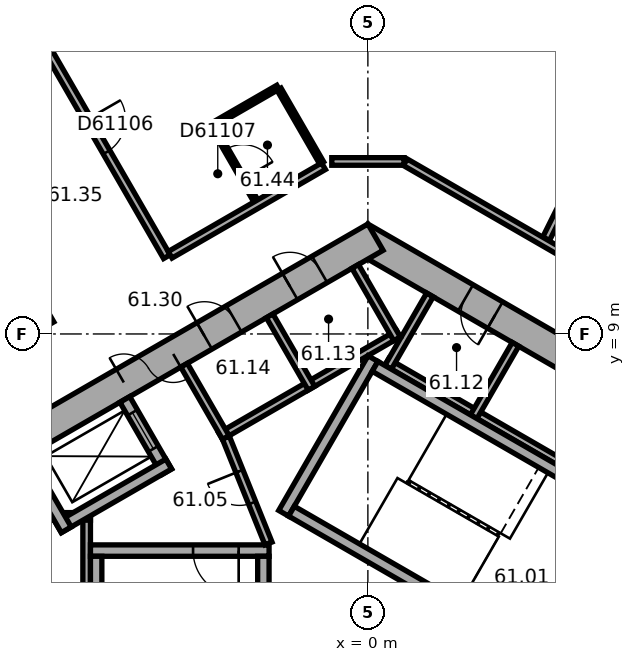
"""IFC4 building model, lengths in metres.
Left out: names, types, materials, properties, quantities, classifications, styles, units other than length and angle.
Written with IfcOpenShell. Run it as: python <this file> out.ifc"""

import sys

from ifc_helpers import new_model, si_unit, direction, frame, frame_2d, origin, place, context, subcontext, project, spatial, rectangle, extrude, element, fill, save


model = new_model("IFC4")
c1 = context("Model", 3, precision=1e-05, world=origin(), true_north=direction((0.0, 1.0)))
c2 = subcontext(c1, "Body", "Model", "MODEL_VIEW")
j1 = project(units=[si_unit("LENGTHUNIT", "METRE"), si_unit("PLANEANGLEUNIT", "RADIAN")], contexts=[c1])
p1 = place(None, origin())
s1 = spatial("IfcSite", under=j1, at=p1, CompositionType="ELEMENT")
p2 = place(p1, origin())
s2 = spatial("IfcBuilding", under=s1, at=p2, CompositionType="ELEMENT")
p3 = place(p2, frame((0.0, 0.0, 247.6)))
s3 = spatial("IfcBuildingStorey", under=s2, at=p3, CompositionType="ELEMENT", Elevation=247.6)
p4 = place(p3, frame((10.1, 5.6, 0.0), z_axis=(0.0, 0.0, 1.0), x_axis=(-0.866023897231, 0.500002609418, 0.0)))
e1 = element("IfcWall", 1, at=p4, inside=s3, PredefinedType="SHEAR", context=c2, shape_type="SweptSolid", body=[
    extrude(rectangle(XDim=11.894, YDim=0.8, at=frame_2d((5.947, 0.0))), origin(), (0.0, 0.0, 1.0), 3.7),
])
p5 = place(p4, frame((3.897, 0.0, 0.0)))
e2 = element("IfcOpeningElement", 2, at=p5, cuts=e1, PredefinedType="OPENING", context=c2, shape_type="SweptSolid", body=[
    extrude(rectangle(XDim=0.9, YDim=2.1, at=frame_2d((0.45, 1.05))), frame((0.0, 0.41, 0.0), z_axis=(0.0, -1.0, 0.0), x_axis=(1.0, 0.0, 0.0)), (0.0, 0.0, 1.0), 0.82),
])
p6 = place(p4, frame((7.797, 0.0, 0.0)))
e3 = element("IfcOpeningElement", 3, at=p6, cuts=e1, PredefinedType="OPENING", context=c2, shape_type="SweptSolid", body=[
    extrude(rectangle(XDim=0.9, YDim=2.1, at=frame_2d((0.45, 1.05))), frame((0.0, 0.41, 0.0), z_axis=(0.0, -1.0, 0.0), x_axis=(1.0, 0.0, 0.0)), (0.0, 0.0, 1.0), 0.82),
])
p7 = place(p3, frame((0.2, 11.547, 0.0), z_axis=(0.0, 0.0, 1.0), x_axis=(-0.866023897231, -0.500002609418, 0.0)))
e4 = element("IfcWall", 4, at=p7, inside=s3, PredefinedType="SHEAR", context=c2, shape_type="SweptSolid", body=[
    extrude(rectangle(XDim=11.894, YDim=0.8, at=frame_2d((5.947, 0.0))), origin(), (0.0, 0.0, 1.0), 3.7),
])
p8 = place(p7, frame((6.147, 0.0, 0.0)))
e5 = element("IfcOpeningElement", 5, at=p8, cuts=e4, PredefinedType="OPENING", context=c2, shape_type="SweptSolid", body=[
    extrude(rectangle(XDim=1.5, YDim=2.1, at=frame_2d((0.75, 1.05))), frame((0.0, 0.41, 0.0), z_axis=(0.0, -1.0, 0.0), x_axis=(1.0, 0.0, 0.0)), (0.0, 0.0, 1.0), 0.82),
])
p9 = place(p7, frame((1.697, 0.0, 0.0)))
e6 = element("IfcOpeningElement", 6, at=p9, cuts=e4, PredefinedType="OPENING", context=c2, shape_type="SweptSolid", body=[
    extrude(rectangle(XDim=0.9, YDim=2.1, at=frame_2d((0.45, 1.05))), frame((0.0, 0.41, 0.0), z_axis=(0.0, -1.0, 0.0), x_axis=(1.0, 0.0, 0.0)), (0.0, 0.0, 1.0), 0.82),
])
p10 = place(p7, frame((4.297, 0.0, 0.0)))
e7 = element("IfcOpeningElement", 7, at=p10, cuts=e4, PredefinedType="OPENING", context=c2, shape_type="SweptSolid", body=[
    extrude(rectangle(XDim=0.9, YDim=2.1, at=frame_2d((0.45, 1.05))), frame((0.0, 0.41, 0.0), z_axis=(0.0, -1.0, 0.0), x_axis=(1.0, 0.0, 0.0)), (0.0, 0.0, 1.0), 0.82),
])
p11 = place(p3, frame((18.299, 13.727, 0.0), z_axis=(0.0, 0.0, 1.0), x_axis=(-0.894934554817, 0.44619742558, 0.0)))
e8 = element("IfcWall", 8, at=p11, inside=s3, PredefinedType="STANDARD", context=c2, shape_type="SweptSolid", body=[
    extrude(rectangle(XDim=18.841, YDim=0.2, at=frame_2d((9.421, 0.0))), origin(), (0.0, 0.0, 1.0), 3.7),
])
p12 = place(p11, frame((1.253, 0.0, 0.9)))
e9 = element("IfcOpeningElement", 9, at=p12, cuts=e8, PredefinedType="OPENING", context=c2, shape_type="SweptSolid", body=[
    extrude(rectangle(XDim=2.2, YDim=2.0, at=frame_2d((1.1, 1.0))), frame((0.0, 0.11, 0.0), z_axis=(0.0, -1.0, 0.0), x_axis=(1.0, 0.0, 0.0)), (0.0, 0.0, 1.0), 0.22),
])
p13 = place(p11, frame((4.786, 0.0, 0.9)))
e10 = element("IfcOpeningElement", 10, at=p13, cuts=e8, PredefinedType="OPENING", context=c2, shape_type="SweptSolid", body=[
    extrude(rectangle(XDim=2.2, YDim=2.0, at=frame_2d((1.1, 1.0))), frame((0.0, 0.11, 0.0), z_axis=(0.0, -1.0, 0.0), x_axis=(1.0, 0.0, 0.0)), (0.0, 0.0, 1.0), 0.22),
])
p14 = place(p11, frame((8.32, 0.0, 0.9)))
e11 = element("IfcOpeningElement", 11, at=p14, cuts=e8, PredefinedType="OPENING", context=c2, shape_type="SweptSolid", body=[
    extrude(rectangle(XDim=2.2, YDim=2.0, at=frame_2d((1.1, 1.0))), frame((0.0, 0.11, 0.0), z_axis=(0.0, -1.0, 0.0), x_axis=(1.0, 0.0, 0.0)), (0.0, 0.0, 1.0), 0.22),
])
p15 = place(p11, frame((11.854, 0.0, 0.9)))
e12 = element("IfcOpeningElement", 12, at=p15, cuts=e8, PredefinedType="OPENING", context=c2, shape_type="SweptSolid", body=[
    extrude(rectangle(XDim=2.2, YDim=2.0, at=frame_2d((1.1, 1.0))), frame((0.0, 0.11, 0.0), z_axis=(0.0, -1.0, 0.0), x_axis=(1.0, 0.0, 0.0)), (0.0, 0.0, 1.0), 0.22),
])
p16 = place(p11, frame((15.387, 0.0, 0.9)))
e13 = element("IfcOpeningElement", 13, at=p16, cuts=e8, PredefinedType="OPENING", context=c2, shape_type="SweptSolid", body=[
    extrude(rectangle(XDim=2.2, YDim=2.0, at=frame_2d((1.1, 1.0))), frame((0.0, 0.11, 0.0), z_axis=(0.0, -1.0, 0.0), x_axis=(1.0, 0.0, 0.0)), (0.0, 0.0, 1.0), 0.22),
])
p17 = place(p3, frame((-2.786, 22.005, 0.0), z_axis=(0.0, 0.0, 1.0), x_axis=(-0.866026555358, -0.49999800541, 0.0)))
e14 = element("IfcWall", 14, at=p17, inside=s3, PredefinedType="STANDARD", context=c2, shape_type="SweptSolid", body=[
    extrude(rectangle(XDim=18.841, YDim=0.2, at=frame_2d((9.421, 0.0))), origin(), (0.0, 0.0, 1.0), 3.7),
])
p18 = place(p17, frame((1.254, 0.0, 0.9)))
e15 = element("IfcOpeningElement", 15, at=p18, cuts=e14, PredefinedType="OPENING", context=c2, shape_type="SweptSolid", body=[
    extrude(rectangle(XDim=2.2, YDim=2.0, at=frame_2d((1.1, 1.0))), frame((0.0, 0.11, 0.0), z_axis=(0.0, -1.0, 0.0), x_axis=(1.0, 0.0, 0.0)), (0.0, 0.0, 1.0), 0.22),
])
p19 = place(p17, frame((4.788, 0.0, 0.9)))
e16 = element("IfcOpeningElement", 16, at=p19, cuts=e14, PredefinedType="OPENING", context=c2, shape_type="SweptSolid", body=[
    extrude(rectangle(XDim=2.2, YDim=2.0, at=frame_2d((1.1, 1.0))), frame((0.0, 0.11, 0.0), z_axis=(0.0, -1.0, 0.0), x_axis=(1.0, 0.0, 0.0)), (0.0, 0.0, 1.0), 0.22),
])
p20 = place(p17, frame((8.321, 0.0, 0.9)))
e17 = element("IfcOpeningElement", 17, at=p20, cuts=e14, PredefinedType="OPENING", context=c2, shape_type="SweptSolid", body=[
    extrude(rectangle(XDim=2.2, YDim=2.0, at=frame_2d((1.1, 1.0))), frame((0.0, 0.11, 0.0), z_axis=(0.0, -1.0, 0.0), x_axis=(1.0, 0.0, 0.0)), (0.0, 0.0, 1.0), 0.22),
])
p21 = place(p17, frame((11.855, 0.0, 0.9)))
e18 = element("IfcOpeningElement", 18, at=p21, cuts=e14, PredefinedType="OPENING", context=c2, shape_type="SweptSolid", body=[
    extrude(rectangle(XDim=2.2, YDim=2.0, at=frame_2d((1.1, 1.0))), frame((0.0, 0.11, 0.0), z_axis=(0.0, -1.0, 0.0), x_axis=(1.0, 0.0, 0.0)), (0.0, 0.0, 1.0), 0.22),
])
p22 = place(p17, frame((15.389, 0.0, 0.9)))
e19 = element("IfcOpeningElement", 19, at=p22, cuts=e14, PredefinedType="OPENING", context=c2, shape_type="SweptSolid", body=[
    extrude(rectangle(XDim=2.2, YDim=2.0, at=frame_2d((1.1, 1.0))), frame((0.0, 0.11, 0.0), z_axis=(0.0, -1.0, 0.0), x_axis=(1.0, 0.0, 0.0)), (0.0, 0.0, 1.0), 0.22),
])
p23 = place(p3, frame((7.424, 4.259, 0.0), z_axis=(0.0, 0.0, 1.0), x_axis=(-0.866026010844, 0.49999894854, 0.0)))
e20 = element("IfcWall", 20, at=p23, inside=s3, PredefinedType="PARTITIONING", context=c2, shape_type="SweptSolid", body=[
    extrude(rectangle(XDim=8.0, YDim=0.2, at=frame_2d((4.0, 0.0))), origin(), (0.0, 0.0, 1.0), 3.42),
])
for number, where, z_axis, x_axis in (
    (21, (2.784, 6.822, 0.0), (0.0, 0.0, 1.0), (0.5, 0.866, 0.0)),
    (22, (0.532, 8.122, 0.0), (0.0, 0.0, 1.0), (0.5, 0.866, 0.0)),
):
    element("IfcWall", number, at=place(p3, frame(where, z_axis=z_axis, x_axis=x_axis)), inside=s3, PredefinedType="PARTITIONING", context=c2, shape_type="SweptSolid", body=[
        extrude(rectangle(XDim=2.2, YDim=0.2, at=frame_2d((1.1, 0.0))), origin(), (0.0, 0.0, 1.0), 3.42),
    ])
p24 = place(p3, frame((0.803, 9.009, 0.0), z_axis=(0.0, 0.0, 1.0), x_axis=(-0.866028230842, -0.499995103361, 0.0)))
e23 = element("IfcWall", 23, at=p24, inside=s3, PredefinedType="PARTITIONING", context=c2, shape_type="SweptSolid", body=[
    extrude(rectangle(XDim=5.4, YDim=0.2, at=frame_2d((2.7, 0.0))), origin(), (0.0, 0.0, 1.0), 3.42),
])
p25 = place(p3, frame((0.767, 8.872, 0.0), z_axis=(0.0, 0.0, 1.0), x_axis=(-0.499994660107, 0.866028486751, 0.0)))
e24 = element("IfcWall", 24, at=p25, inside=s3, PredefinedType="PARTITIONING", context=c2, shape_type="SweptSolid", body=[
    extrude(rectangle(XDim=2.2, YDim=0.2, at=frame_2d((1.1, 0.0))), origin(), (0.0, 0.0, 1.0), 3.42),
])
for number, where, z_axis, x_axis in (
    (25, (-1.485, 7.572, 0.0), (0.0, 0.0, 1.0), (-0.5, 0.866, 0.0)),
    (26, (-3.737, 6.272, 0.0), (0.0, 0.0, 1.0), (-0.5, 0.866, 0.0)),
):
    element("IfcWall", number, at=place(p3, frame(where, z_axis=z_axis, x_axis=x_axis)), inside=s3, PredefinedType="PARTITIONING", context=c2, shape_type="SweptSolid", body=[
        extrude(rectangle(XDim=2.2, YDim=0.2, at=frame_2d((1.1, 0.0))), origin(), (0.0, 0.0, 1.0), 3.42),
    ])
p26 = place(p3, frame((-7.4, 4.3, 0.0), z_axis=(0.0, 0.0, 1.0), x_axis=(0.0, -1.0, 0.0)))
e27 = element("IfcWall", 27, at=p26, inside=s3, PredefinedType="PARTITIONING", context=c2, shape_type="SweptSolid", body=[
    extrude(rectangle(XDim=8.0, YDim=0.2, at=frame_2d((4.0, 0.0))), origin(), (0.0, 0.0, 1.0), 3.42),
])
p27 = place(p3, frame((-7.3, 4.2, 0.0), z_axis=(0.0, 0.0, 1.0), x_axis=(-1.0, 0.0, 0.0)))
e28 = element("IfcWall", 28, at=p27, inside=s3, PredefinedType="PARTITIONING", context=c2, shape_type="SweptSolid", body=[
    extrude(rectangle(XDim=2.2, YDim=0.2, at=frame_2d((1.1, 0.0))), origin(), (0.0, 0.0, 1.0), 3.42),
])
p28 = place(p3, frame((4.158, 0.602, 0.0), z_axis=(0.0, 0.0, 1.0), x_axis=(0.499977259774, 0.866038532462, 0.0)))
e29 = element("IfcWall", 29, at=p28, inside=s3, PredefinedType="SHEAR", context=c2, shape_type="SweptSolid", body=[
    extrude(rectangle(XDim=4.7, YDim=0.3, at=frame_2d((2.35, 0.0))), origin(), (0.0, 0.0, 1.0), 3.42),
])
p29 = place(p28, frame((0.8, 0.0, 0.0)))
e30 = element("IfcOpeningElement", 30, at=p29, cuts=e29, PredefinedType="OPENING", context=c2, shape_type="SweptSolid", body=[
    extrude(rectangle(XDim=1.2, YDim=2.1, at=frame_2d((0.6, 1.05))), frame((0.0, 0.16, 0.0), z_axis=(0.0, -1.0, 0.0), x_axis=(1.0, 0.0, 0.0)), (0.0, 0.0, 1.0), 0.32),
])
p30 = place(p3, frame((-2.216, 4.282, 0.0), z_axis=(0.0, 0.0, 1.0), x_axis=(0.499977259774, 0.866038532462, 0.0)))
e31 = element("IfcWall", 31, at=p30, inside=s3, PredefinedType="SHEAR", context=c2, shape_type="SweptSolid", body=[
    extrude(rectangle(XDim=4.7, YDim=0.3, at=frame_2d((2.35, 0.0))), origin(), (0.0, 0.0, 1.0), 3.42),
])
for number, where, z_axis, x_axis in (
    (32, (4.103, 0.807, 0.0), (0.0, 0.0, 1.0), (-0.866, 0.5, 0.0)),
    (33, (6.303, 4.617, 0.0), (0.0, 0.0, 1.0), (-0.866, 0.5, 0.0)),
):
    element("IfcWall", number, at=place(p3, frame(where, z_axis=z_axis, x_axis=x_axis)), inside=s3, PredefinedType="SHEAR", context=c2, shape_type="SweptSolid", body=[
        extrude(rectangle(XDim=7.06, YDim=0.3, at=frame_2d((3.53, 0.0))), origin(), (0.0, 0.0, 1.0), 3.42),
    ])
p31 = place(p3, frame((-2.6, 3.3, 0.0), z_axis=(0.0, 0.0, 1.0), x_axis=(-1.0, 0.0, 0.0)))
e34 = element("IfcWall", 34, at=p31, inside=s3, PredefinedType="SHEAR", context=c2, shape_type="SweptSolid", body=[
    extrude(rectangle(XDim=4.7, YDim=0.3, at=frame_2d((2.35, 0.0))), origin(), (0.0, 0.0, 1.0), 3.42),
])
p32 = place(p31, frame((0.8, 0.0, 0.0)))
e35 = element("IfcOpeningElement", 35, at=p32, cuts=e34, PredefinedType="OPENING", context=c2, shape_type="SweptSolid", body=[
    extrude(rectangle(XDim=1.2, YDim=2.1, at=frame_2d((0.6, 1.05))), frame((0.0, 0.16, 0.0), z_axis=(0.0, -1.0, 0.0), x_axis=(1.0, 0.0, 0.0)), (0.0, 0.0, 1.0), 0.32),
])
for number, where, z_axis, x_axis in (
    (36, (-2.75, 3.15, 0.0), (0.0, 0.0, 1.0), (0.0, -1.0, 0.0)),
    (37, (-7.15, 3.15, 0.0), (0.0, 0.0, 1.0), (0.0, -1.0, 0.0)),
):
    element("IfcWall", number, at=place(p3, frame(where, z_axis=z_axis, x_axis=x_axis)), inside=s3, PredefinedType="SHEAR", context=c2, shape_type="SweptSolid", body=[
        extrude(rectangle(XDim=7.06, YDim=0.3, at=frame_2d((3.53, 0.0))), origin(), (0.0, 0.0, 1.0), 3.42),
    ])
p33 = place(p3, frame((-5.295, 5.372, 0.0), z_axis=(0.0, 0.0, 1.0), x_axis=(-0.500077893725, 0.86598042715, 0.0)))
e38 = element("IfcWall", 38, at=p33, inside=s3, PredefinedType="SHEAR", context=c2, shape_type="SweptSolid", body=[
    extrude(rectangle(XDim=2.2, YDim=0.3, at=frame_2d((1.1, 0.0))), origin(), (0.0, 0.0, 1.0), 3.42),
])
p34 = place(p33, frame((0.7, 0.0, 0.0)))
e39 = element("IfcOpeningElement", 39, at=p34, cuts=e38, PredefinedType="OPENING", context=c2, shape_type="SweptSolid", body=[
    extrude(rectangle(XDim=1.1, YDim=2.1, at=frame_2d((0.55, 1.05))), frame((0.0, 0.16, 0.0), z_axis=(0.0, -1.0, 0.0), x_axis=(1.0, 0.0, 0.0)), (0.0, 0.0, 1.0), 0.32),
])
p35 = place(p3, frame((-5.24, 5.577, 0.0), z_axis=(0.0, 0.0, 1.0), x_axis=(-0.866014461049, -0.500018952895, 0.0)))
e40 = element("IfcWall", 40, at=p35, inside=s3, PredefinedType="SHEAR", context=c2, shape_type="SweptSolid", body=[
    extrude(rectangle(XDim=3.35, YDim=0.3, at=frame_2d((1.675, 0.0))), origin(), (0.0, 0.0, 1.0), 3.42),
])
p36 = place(p3, frame((-7.937, 3.847, 0.0), z_axis=(0.0, 0.0, 1.0), x_axis=(-0.50002983664, 0.866008176907, 0.0)))
e41 = element("IfcWall", 41, at=p36, inside=s3, PredefinedType="SHEAR", context=c2, shape_type="SweptSolid", body=[
    extrude(rectangle(XDim=2.2, YDim=0.3, at=frame_2d((1.1, 0.0))), origin(), (0.0, 0.0, 1.0), 3.42),
])
p37 = place(p3, frame((-2.615, 3.487, 0.0), z_axis=(0.0, 0.0, 1.0), x_axis=(-0.373576831041, 0.92759924068, 0.0)))
e42 = element("IfcWall", 42, at=p37, inside=s3, PredefinedType="PARTITIONING", context=c2, shape_type="SweptSolid", body=[
    extrude(rectangle(XDim=3.002, YDim=0.2, at=frame_2d((1.501, 0.0))), origin(), (0.0, 0.0, 1.0), 3.42),
])
p38 = place(p37, frame((1.15, 0.0, 0.0)))
e43 = element("IfcOpeningElement", 43, at=p38, cuts=e42, PredefinedType="OPENING", context=c2, shape_type="SweptSolid", body=[
    extrude(rectangle(XDim=0.9, YDim=2.1, at=frame_2d((0.45, 1.05))), frame((0.0, 0.11, 0.0), z_axis=(0.0, -1.0, 0.0), x_axis=(1.0, 0.0, 0.0)), (0.0, 0.0, 1.0), 0.22),
])
p39 = place(p3, frame((-12.025, 15.632, 0.0), z_axis=(0.0, 0.0, 1.0), x_axis=(0.499983153418, -0.866035129944, 0.0)))
e44 = element("IfcWall", 44, at=p39, inside=s3, PredefinedType="PARTITIONING", context=c2, shape_type="SweptSolid", body=[
    extrude(rectangle(XDim=7.35, YDim=0.2, at=frame_2d((3.675, 0.0))), origin(), (0.0, 0.0, 1.0), 3.42),
])
p40 = place(p39, frame((3.175, 0.0, 0.0)))
e45 = element("IfcOpeningElement", 45, at=p40, cuts=e44, PredefinedType="OPENING", context=c2, shape_type="SweptSolid", body=[
    extrude(rectangle(XDim=1.0, YDim=2.1, at=frame_2d((0.5, 1.05))), frame((0.0, 0.11, 0.0), z_axis=(0.0, -1.0, 0.0), x_axis=(1.0, 0.0, 0.0)), (0.0, 0.0, 1.0), 0.22),
])
p41 = place(p3, frame((-8.965, 17.399, 0.0), z_axis=(0.0, 0.0, 1.0), x_axis=(0.499993683172, -0.866029050776, 0.0)))
e46 = element("IfcWall", 46, at=p41, inside=s3, PredefinedType="PARTITIONING", context=c2, shape_type="SweptSolid", body=[
    extrude(rectangle(XDim=7.35, YDim=0.2, at=frame_2d((3.675, 0.0))), origin(), (0.0, 0.0, 1.0), 2.87),
])
p42 = place(p41, frame((3.175, 0.0, 0.0)))
e47 = element("IfcOpeningElement", 47, at=p42, cuts=e46, PredefinedType="OPENING", context=c2, shape_type="SweptSolid", body=[
    extrude(rectangle(XDim=1.0, YDim=2.1, at=frame_2d((0.5, 1.05))), frame((0.0, 0.11, 0.0), z_axis=(0.0, -1.0, 0.0), x_axis=(1.0, 0.0, 0.0)), (0.0, 0.0, 1.0), 0.22),
])
p43 = place(p3, frame((-4.099, 14.492, 0.0), z_axis=(0.0, 0.0, 1.0), x_axis=(0.866041268327, 0.499972520799, 0.0)))
e48 = element("IfcWall", 48, at=p43, inside=s3, PredefinedType="PARTITIONING", context=c2, shape_type="SweptSolid", body=[
    extrude(rectangle(XDim=2.0, YDim=0.12, at=frame_2d((1.0, 0.0))), origin(), (0.0, 0.0, 1.0), 3.42),
])
p44 = place(p3, frame((-2.948, 12.5, 0.0), z_axis=(0.0, 0.0, 1.0), x_axis=(-0.500077830873, 0.865980463445, 0.0)))
e49 = element("IfcWall", 49, at=p44, inside=s3, PredefinedType="PARTITIONING", context=c2, shape_type="SweptSolid", body=[
    extrude(rectangle(XDim=2.24, YDim=0.12, at=frame_2d((1.12, 0.0))), origin(), (0.0, 0.0, 1.0), 3.42),
])
p45 = place(p44, frame((0.67, 0.0, 0.0)))
e50 = element("IfcOpeningElement", 50, at=p45, cuts=e49, PredefinedType="OPENING", context=c2, shape_type="SweptSolid", body=[
    extrude(rectangle(XDim=0.9, YDim=2.1, at=frame_2d((0.45, 1.05))), frame((0.0, 0.07, 0.0), z_axis=(0.0, -1.0, 0.0), x_axis=(1.0, 0.0, 0.0)), (0.0, 0.0, 1.0), 0.14),
])
p46 = place(p3, frame((-2.336, 15.44, 0.0), z_axis=(0.0, 0.0, 1.0), x_axis=(0.49999608499, -0.866027664105, 0.0)))
e51 = element("IfcWall", 51, at=p46, inside=s3, PredefinedType="PARTITIONING", context=c2, shape_type="SweptSolid", body=[
    extrude(rectangle(XDim=2.24, YDim=0.12, at=frame_2d((1.12, 0.0))), origin(), (0.0, 0.0, 1.0), 3.42),
])
p47 = place(p3, frame((-1.167, 13.414, 0.0), z_axis=(0.0, 0.0, 1.0), x_axis=(-0.866023347809, -0.500003561037, 0.0)))
e52 = element("IfcWall", 52, at=p47, inside=s3, PredefinedType="PARTITIONING", context=c2, shape_type="SweptSolid", body=[
    extrude(rectangle(XDim=4.661, YDim=0.2, at=frame_2d((2.331, 0.0))), origin(), (0.0, 0.0, 1.0), 3.42),
])
p48 = place(p3, frame((0.95, 13.539, 0.0), z_axis=(0.0, 0.0, 1.0), x_axis=(-1.0, 0.0, 0.0)))
e53 = element("IfcWall", 53, at=p48, inside=s3, PredefinedType="PARTITIONING", context=c2, shape_type="SweptSolid", body=[
    extrude(rectangle(XDim=1.9, YDim=0.2, at=frame_2d((0.95, 0.0))), origin(), (0.0, 0.0, 1.0), 3.42),
])
p49 = place(p3, frame((7.886, 17.913, 0.0), z_axis=(0.0, 0.0, 1.0), x_axis=(-0.446204015428, -0.894931269213, 0.0)))
e54 = element("IfcWall", 54, at=p49, inside=s3, PredefinedType="PARTITIONING", context=c2, shape_type="SweptSolid", body=[
    extrude(rectangle(XDim=7.16, YDim=0.2, at=frame_2d((3.58, 0.0))), origin(), (0.0, 0.0, 1.0), 3.42),
])
p50 = place(p3, frame((11.25, 7.592, 0.0), z_axis=(0.0, 0.0, 1.0), x_axis=(-0.866024037175, 0.500002367029, 0.0)))
e55 = element("IfcWall", 55, at=p50, inside=s3, PredefinedType="PARTITIONING", context=c2, shape_type="SweptSolid", body=[
    extrude(rectangle(XDim=11.854, YDim=0.2, at=frame_2d((5.927, 0.0))), origin(), (0.0, 0.0, 1.0), 3.42),
])
p51 = place(p50, frame((3.59, 0.0, 0.0)))
e56 = element("IfcOpeningElement", 56, at=p51, cuts=e55, PredefinedType="OPENING", context=c2, shape_type="SweptSolid", body=[
    extrude(rectangle(XDim=1.0, YDim=2.1, at=frame_2d((0.5, 1.05))), frame((0.0, 0.11, 0.0), z_axis=(0.0, -1.0, 0.0), x_axis=(1.0, 0.0, 0.0)), (0.0, 0.0, 1.0), 0.22),
])
p52 = place(p8, origin())
e57 = element("IfcDoor", 57, at=p52, inside=s3, OperationType="DOUBLE_DOOR_SINGLE_SWING", PredefinedType="DOOR", context=c2, shape_type="SweptSolid", body=[
    extrude(rectangle(XDim=1.5, YDim=2.1, at=frame_2d((0.75, 1.05))), frame((0.0, 0.025, 0.0), z_axis=(0.0, -1.0, 0.0), x_axis=(1.0, 0.0, 0.0)), (0.0, 0.0, 1.0), 0.05),
])
fill(e5, e57)
p53 = place(p32, origin())
e58 = element("IfcDoor", 58, at=p53, inside=s3, OperationType="SINGLE_SWING_RIGHT", PredefinedType="DOOR", context=c2, shape_type="SweptSolid", body=[
    extrude(rectangle(XDim=1.2, YDim=2.1, at=frame_2d((0.6, 1.05))), frame((0.0, 0.025, 0.0), z_axis=(0.0, -1.0, 0.0), x_axis=(1.0, 0.0, 0.0)), (0.0, 0.0, 1.0), 0.05),
])
fill(e35, e58)
p54 = place(p38, origin())
e59 = element("IfcDoor", 59, at=p54, inside=s3, OperationType="SINGLE_SWING_LEFT", PredefinedType="DOOR", context=c2, shape_type="SweptSolid", body=[
    extrude(rectangle(XDim=0.9, YDim=2.1, at=frame_2d((0.45, 1.05))), frame((0.0, 0.025, 0.0), z_axis=(0.0, -1.0, 0.0), x_axis=(1.0, 0.0, 0.0)), (0.0, 0.0, 1.0), 0.05),
])
fill(e43, e59)
p55 = place(p6, origin())
e60 = element("IfcDoor", 60, at=p55, inside=s3, OperationType="SINGLE_SWING_LEFT", PredefinedType="DOOR", context=c2, shape_type="SweptSolid", body=[
    extrude(rectangle(XDim=0.9, YDim=2.1, at=frame_2d((0.45, 1.05))), frame((0.0, 0.025, 0.0), z_axis=(0.0, -1.0, 0.0), x_axis=(1.0, 0.0, 0.0)), (0.0, 0.0, 1.0), 0.05),
])
fill(e3, e60)
p56 = place(p9, origin())
e61 = element("IfcDoor", 61, at=p56, inside=s3, OperationType="SINGLE_SWING_LEFT", PredefinedType="DOOR", context=c2, shape_type="SweptSolid", body=[
    extrude(rectangle(XDim=0.9, YDim=2.1, at=frame_2d((0.45, 1.05))), frame((0.0, 0.025, 0.0), z_axis=(0.0, -1.0, 0.0), x_axis=(1.0, 0.0, 0.0)), (0.0, 0.0, 1.0), 0.05),
])
fill(e6, e61)
p57 = place(p10, origin())
e62 = element("IfcDoor", 62, at=p57, inside=s3, OperationType="SINGLE_SWING_LEFT", PredefinedType="DOOR", context=c2, shape_type="SweptSolid", body=[
    extrude(rectangle(XDim=0.9, YDim=2.1, at=frame_2d((0.45, 1.05))), frame((0.0, 0.025, 0.0), z_axis=(0.0, -1.0, 0.0), x_axis=(1.0, 0.0, 0.0)), (0.0, 0.0, 1.0), 0.05),
])
fill(e7, e62)
p58 = place(p34, origin())
e63 = element("IfcDoor", 63, at=p58, inside=s3, OperationType="DOUBLE_DOOR_SLIDING", PredefinedType="DOOR", context=c2, shape_type="SweptSolid", body=[
    extrude(rectangle(XDim=1.1, YDim=2.1, at=frame_2d((0.55, 1.05))), frame((0.0, 0.025, 0.0), z_axis=(0.0, -1.0, 0.0), x_axis=(1.0, 0.0, 0.0)), (0.0, 0.0, 1.0), 0.05),
])
fill(e39, e63)
p59 = place(p42, origin())
e64 = element("IfcDoor", 64, at=p59, inside=s3, OperationType="SINGLE_SWING_LEFT", PredefinedType="DOOR", context=c2, shape_type="SweptSolid", body=[
    extrude(rectangle(XDim=1.0, YDim=2.1, at=frame_2d((0.5, 1.05))), frame((0.0, 0.025, 0.0), z_axis=(0.0, -1.0, 0.0), x_axis=(1.0, 0.0, 0.0)), (0.0, 0.0, 1.0), 0.05),
])
fill(e47, e64)
p60 = place(p45, origin())
e65 = element("IfcDoor", 65, at=p60, inside=s3, OperationType="SINGLE_SWING_LEFT", PredefinedType="DOOR", context=c2, shape_type="SweptSolid", body=[
    extrude(rectangle(XDim=0.9, YDim=2.1, at=frame_2d((0.45, 1.05))), frame((0.0, 0.025, 0.0), z_axis=(0.0, -1.0, 0.0), x_axis=(1.0, 0.0, 0.0)), (0.0, 0.0, 1.0), 0.05),
])
fill(e50, e65)
save(model, sys.argv[1])
